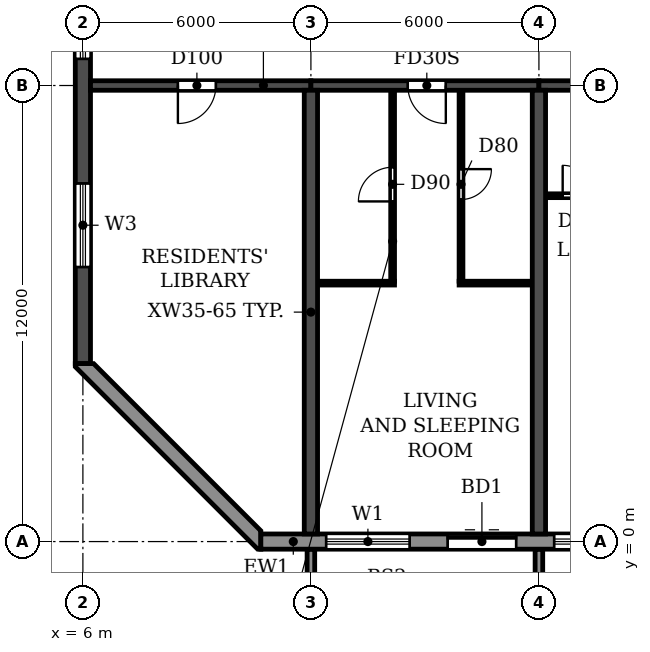
"""IFC4 building model, lengths in metres.
Left out: names, types, materials, properties, quantities, classifications, styles, units other than length and angle.
Written with IfcOpenShell. Run it as: python <this file> out.ifc"""

import sys

from ifc_helpers import new_model, si_unit, direction, frame, frame_2d, origin, place, context, subcontext, project, spatial, polyline, rectangle, outline, extrude, source, transform, mapped, element, fill, save


model = new_model("IFC4")
c1 = context("Model", 3, precision=1e-05, world=origin(), true_north=direction((0.0, 1.0)))
c2 = subcontext(c1, "Body", "Model", "MODEL_VIEW")
j1 = project(units=[si_unit("LENGTHUNIT", "METRE"), si_unit("PLANEANGLEUNIT", "RADIAN")], contexts=[c1])
p1 = place(None, origin())
s1 = spatial("IfcSite", under=j1, at=p1, CompositionType="ELEMENT")
p2 = place(p1, origin())
s2 = spatial("IfcBuilding", under=s1, at=p2, CompositionType="ELEMENT")
p3 = place(p2, frame((0.0, 0.0, 92.7)))
s3 = spatial("IfcBuildingStorey", under=s2, at=p3, CompositionType="ELEMENT", Elevation=92.7)
for number, where, z_axis, x_axis in (
    (1, (12.0, 0.2, 0.0), (0.0, 0.0, 1.0), (0.0, 1.0, 0.0)),
    (2, (18.0, 0.2, 0.0), (0.0, 0.0, 1.0), (0.0, 1.0, 0.0)),
):
    element("IfcWall", number, at=place(p3, frame(where, z_axis=z_axis, x_axis=x_axis)), inside=s3, PredefinedType="SHEAR", context=c2, shape_type="SweptSolid", body=[
        extrude(rectangle(XDim=11.675, YDim=0.35, at=frame_2d((5.837, 0.0))), origin(), (0.0, 0.0, 1.0), 3.06),
    ])
p4 = place(p3, frame((6.0, 4.683, 0.0), z_axis=(0.0, 0.0, 1.0), x_axis=(0.0, 1.0, 0.0)))
e3 = element("IfcWall", 3, at=p4, inside=s3, PredefinedType="SHEAR", context=c2, shape_type="SweptSolid", body=[
    extrude(rectangle(XDim=34.234, YDim=0.4, at=frame_2d((17.117, 0.0))), origin(), (0.0, 0.0, 1.0), 3.06),
])
p5 = place(p4, frame((23.817, 0.0, 0.9)))
e4 = element("IfcOpeningElement", 4, at=p5, cuts=e3, PredefinedType="OPENING", context=c2, shape_type="SweptSolid", body=[
    extrude(rectangle(XDim=1.2, YDim=1.5, at=frame_2d((0.6, 0.75))), frame((0.0, 0.21, 0.0), z_axis=(0.0, -1.0, 0.0), x_axis=(1.0, 0.0, 0.0)), (0.0, 0.0, 1.0), 0.42),
])
p6 = place(p4, frame((8.017, 0.0, 0.9)))
e5 = element("IfcOpeningElement", 5, at=p6, cuts=e3, PredefinedType="OPENING", context=c2, shape_type="SweptSolid", body=[
    extrude(rectangle(XDim=1.2, YDim=1.5, at=frame_2d((0.6, 0.75))), frame((0.0, 0.21, 0.0), z_axis=(0.0, -1.0, 0.0), x_axis=(1.0, 0.0, 0.0)), (0.0, 0.0, 1.0), 0.42),
])
p7 = place(p4, frame((15.917, 0.0, 0.9)))
e6 = element("IfcOpeningElement", 6, at=p7, cuts=e3, PredefinedType="OPENING", context=c2, shape_type="SweptSolid", body=[
    extrude(rectangle(XDim=1.2, YDim=1.5, at=frame_2d((0.6, 0.75))), frame((0.0, 0.21, 0.0), z_axis=(0.0, -1.0, 0.0), x_axis=(1.0, 0.0, 0.0)), (0.0, 0.0, 1.0), 0.42),
])
p8 = place(p4, frame((28.894, 0.0, 0.6)))
e7 = element("IfcOpeningElement", 7, at=p8, cuts=e3, PredefinedType="OPENING", context=c2, shape_type="SweptSolid", body=[
    extrude(rectangle(XDim=2.2, YDim=1.8, at=frame_2d((1.1, 0.9))), frame((0.0, 0.21, 0.0), z_axis=(0.0, -1.0, 0.0), x_axis=(1.0, 0.0, 0.0)), (0.0, 0.0, 1.0), 0.42),
])
p9 = place(p4, frame((2.541, 0.0, 0.6)))
e8 = element("IfcOpeningElement", 8, at=p9, cuts=e3, PredefinedType="OPENING", context=c2, shape_type="SweptSolid", body=[
    extrude(rectangle(XDim=2.2, YDim=1.8, at=frame_2d((1.1, 0.9))), frame((0.0, 0.21, 0.0), z_axis=(0.0, -1.0, 0.0), x_axis=(1.0, 0.0, 0.0)), (0.0, 0.0, 1.0), 0.42),
])
p10 = place(p3, frame((6.2, 12.0, 0.0), z_axis=(0.0, 0.0, 1.0), x_axis=(1.0, 0.0, 0.0)))
e9 = element("IfcWall", 9, at=p10, inside=s3, PredefinedType="SHEAR", context=c2, shape_type="SweptSolid", body=[
    extrude(rectangle(XDim=5.8, YDim=0.25, at=frame_2d((2.9, 0.0))), origin(), (0.0, 0.0, 1.0), 2.46),
])
p11 = place(p10, frame((2.3, 0.0, 0.0)))
e10 = element("IfcOpeningElement", 10, at=p11, cuts=e9, PredefinedType="OPENING", context=c2, shape_type="SweptSolid", body=[
    extrude(rectangle(XDim=1.0, YDim=2.1, at=frame_2d((0.5, 1.05))), frame((0.0, 0.135, 0.0), z_axis=(0.0, -1.0, 0.0), x_axis=(1.0, 0.0, 0.0)), (0.0, 0.0, 1.0), 0.27),
])
p12 = place(p3, frame((12.0, 12.0, 0.0), z_axis=(0.0, 0.0, 1.0), x_axis=(1.0, 0.0, 0.0)))
e11 = element("IfcWall", 11, at=p12, inside=s3, PredefinedType="SHEAR", context=c2, shape_type="SweptSolid", body=[
    extrude(rectangle(XDim=6.0, YDim=0.25, at=frame_2d((3.0, 0.0))), origin(), (0.0, 0.0, 1.0), 2.46),
])
p13 = place(p12, frame((2.55, 0.0, 0.0)))
e12 = element("IfcOpeningElement", 12, at=p13, cuts=e11, PredefinedType="OPENING", context=c2, shape_type="SweptSolid", body=[
    extrude(rectangle(XDim=1.0, YDim=2.1, at=frame_2d((0.5, 1.05))), frame((0.0, 0.135, 0.0), z_axis=(0.0, -1.0, 0.0), x_axis=(1.0, 0.0, 0.0)), (0.0, 0.0, 1.0), 0.27),
])
p14 = place(p3, frame((18.0, 12.0, 0.0), z_axis=(0.0, 0.0, 1.0), x_axis=(1.0, 0.0, 0.0)))
e13 = element("IfcWall", 13, at=p14, inside=s3, PredefinedType="SHEAR", context=c2, shape_type="SweptSolid", body=[
    extrude(rectangle(XDim=6.0, YDim=0.25, at=frame_2d((3.0, 0.0))), origin(), (0.0, 0.0, 1.0), 2.46),
])
p15 = place(p14, frame((2.45, 0.0, 0.0)))
e14 = element("IfcOpeningElement", 14, at=p15, cuts=e13, PredefinedType="OPENING", context=c2, shape_type="SweptSolid", body=[
    extrude(rectangle(XDim=1.0, YDim=2.1, at=frame_2d((0.5, 1.05))), frame((0.0, 0.135, 0.0), z_axis=(0.0, -1.0, 0.0), x_axis=(1.0, 0.0, 0.0)), (0.0, 0.0, 1.0), 0.27),
])
p16 = place(p3, frame((10.683, 0.0, 0.0), z_axis=(0.0, 0.0, 1.0), x_axis=(1.0, 0.0, 0.0)))
e15 = element("IfcWall", 15, at=p16, inside=s3, PredefinedType="STANDARD", context=c2, shape_type="SweptSolid", body=[
    extrude(rectangle(XDim=80.634, YDim=0.4, at=frame_2d((40.317, 0.0))), origin(), (0.0, 0.0, 1.0), 3.06),
])
p17 = place(p16, frame((1.717, 0.0, 0.9)))
e16 = element("IfcOpeningElement", 16, at=p17, cuts=e15, PredefinedType="OPENING", context=c2, shape_type="SweptSolid", body=[
    extrude(rectangle(XDim=2.2, YDim=1.5, at=frame_2d((1.1, 0.75))), frame((0.0, 0.21, 0.0), z_axis=(0.0, -1.0, 0.0), x_axis=(1.0, 0.0, 0.0)), (0.0, 0.0, 1.0), 0.42),
])
p18 = place(p16, frame((4.917, 0.0, 0.0)))
e17 = element("IfcOpeningElement", 17, at=p18, cuts=e15, PredefinedType="OPENING", context=c2, shape_type="SweptSolid", body=[
    extrude(rectangle(XDim=1.8, YDim=2.4, at=frame_2d((0.9, 1.2))), frame((0.0, 0.21, 0.0), z_axis=(0.0, -1.0, 0.0), x_axis=(1.0, 0.0, 0.0)), (0.0, 0.0, 1.0), 0.42),
])
p19 = place(p16, frame((7.717, 0.0, 0.9)))
e18 = element("IfcOpeningElement", 18, at=p19, cuts=e15, PredefinedType="OPENING", context=c2, shape_type="SweptSolid", body=[
    extrude(rectangle(XDim=2.2, YDim=1.5, at=frame_2d((1.1, 0.75))), frame((0.0, 0.21, 0.0), z_axis=(0.0, -1.0, 0.0), x_axis=(1.0, 0.0, 0.0)), (0.0, 0.0, 1.0), 0.42),
])
p20 = place(p16, frame((10.717, 0.0, 0.9)))
e19 = element("IfcOpeningElement", 19, at=p20, cuts=e15, PredefinedType="OPENING", context=c2, shape_type="SweptSolid", body=[
    extrude(rectangle(XDim=2.2, YDim=1.5, at=frame_2d((1.1, 0.75))), frame((0.0, 0.21, 0.0), z_axis=(0.0, -1.0, 0.0), x_axis=(1.0, 0.0, 0.0)), (0.0, 0.0, 1.0), 0.42),
])
p21 = place(p16, frame((13.717, 0.0, 0.9)))
e20 = element("IfcOpeningElement", 20, at=p21, cuts=e15, PredefinedType="OPENING", context=c2, shape_type="SweptSolid", body=[
    extrude(rectangle(XDim=2.2, YDim=1.5, at=frame_2d((1.1, 0.75))), frame((0.0, 0.21, 0.0), z_axis=(0.0, -1.0, 0.0), x_axis=(1.0, 0.0, 0.0)), (0.0, 0.0, 1.0), 0.42),
])
p22 = place(p16, frame((16.717, 0.0, 0.9)))
e21 = element("IfcOpeningElement", 21, at=p22, cuts=e15, PredefinedType="OPENING", context=c2, shape_type="SweptSolid", body=[
    extrude(rectangle(XDim=2.2, YDim=1.5, at=frame_2d((1.1, 0.75))), frame((0.0, 0.21, 0.0), z_axis=(0.0, -1.0, 0.0), x_axis=(1.0, 0.0, 0.0)), (0.0, 0.0, 1.0), 0.42),
])
p23 = place(p16, frame((19.717, 0.0, 0.9)))
e22 = element("IfcOpeningElement", 22, at=p23, cuts=e15, PredefinedType="OPENING", context=c2, shape_type="SweptSolid", body=[
    extrude(rectangle(XDim=2.2, YDim=1.5, at=frame_2d((1.1, 0.75))), frame((0.0, 0.21, 0.0), z_axis=(0.0, -1.0, 0.0), x_axis=(1.0, 0.0, 0.0)), (0.0, 0.0, 1.0), 0.42),
])
p24 = place(p16, frame((22.717, 0.0, 0.9)))
e23 = element("IfcOpeningElement", 23, at=p24, cuts=e15, PredefinedType="OPENING", context=c2, shape_type="SweptSolid", body=[
    extrude(rectangle(XDim=2.2, YDim=1.5, at=frame_2d((1.1, 0.75))), frame((0.0, 0.21, 0.0), z_axis=(0.0, -1.0, 0.0), x_axis=(1.0, 0.0, 0.0)), (0.0, 0.0, 1.0), 0.42),
])
p25 = place(p16, frame((25.717, 0.0, 0.9)))
e24 = element("IfcOpeningElement", 24, at=p25, cuts=e15, PredefinedType="OPENING", context=c2, shape_type="SweptSolid", body=[
    extrude(rectangle(XDim=2.2, YDim=1.5, at=frame_2d((1.1, 0.75))), frame((0.0, 0.21, 0.0), z_axis=(0.0, -1.0, 0.0), x_axis=(1.0, 0.0, 0.0)), (0.0, 0.0, 1.0), 0.42),
])
p26 = place(p16, frame((28.917, 0.0, 0.0)))
e25 = element("IfcOpeningElement", 25, at=p26, cuts=e15, PredefinedType="OPENING", context=c2, shape_type="SweptSolid", body=[
    extrude(rectangle(XDim=1.8, YDim=2.4, at=frame_2d((0.9, 1.2))), frame((0.0, 0.21, 0.0), z_axis=(0.0, -1.0, 0.0), x_axis=(1.0, 0.0, 0.0)), (0.0, 0.0, 1.0), 0.42),
])
p27 = place(p16, frame((31.717, 0.0, 0.9)))
e26 = element("IfcOpeningElement", 26, at=p27, cuts=e15, PredefinedType="OPENING", context=c2, shape_type="SweptSolid", body=[
    extrude(rectangle(XDim=2.2, YDim=1.5, at=frame_2d((1.1, 0.75))), frame((0.0, 0.21, 0.0), z_axis=(0.0, -1.0, 0.0), x_axis=(1.0, 0.0, 0.0)), (0.0, 0.0, 1.0), 0.42),
])
p28 = place(p16, frame((34.717, 0.0, 0.9)))
e27 = element("IfcOpeningElement", 27, at=p28, cuts=e15, PredefinedType="OPENING", context=c2, shape_type="SweptSolid", body=[
    extrude(rectangle(XDim=2.2, YDim=1.5, at=frame_2d((1.1, 0.75))), frame((0.0, 0.21, 0.0), z_axis=(0.0, -1.0, 0.0), x_axis=(1.0, 0.0, 0.0)), (0.0, 0.0, 1.0), 0.42),
])
p29 = place(p16, frame((37.917, 0.0, 0.0)))
e28 = element("IfcOpeningElement", 28, at=p29, cuts=e15, PredefinedType="OPENING", context=c2, shape_type="SweptSolid", body=[
    extrude(rectangle(XDim=1.8, YDim=2.4, at=frame_2d((0.9, 1.2))), frame((0.0, 0.21, 0.0), z_axis=(0.0, -1.0, 0.0), x_axis=(1.0, 0.0, 0.0)), (0.0, 0.0, 1.0), 0.42),
])
p30 = place(p16, frame((40.717, 0.0, 0.9)))
e29 = element("IfcOpeningElement", 29, at=p30, cuts=e15, PredefinedType="OPENING", context=c2, shape_type="SweptSolid", body=[
    extrude(rectangle(XDim=2.2, YDim=1.5, at=frame_2d((1.1, 0.75))), frame((0.0, 0.21, 0.0), z_axis=(0.0, -1.0, 0.0), x_axis=(1.0, 0.0, 0.0)), (0.0, 0.0, 1.0), 0.42),
])
p31 = place(p16, frame((43.717, 0.0, 0.9)))
e30 = element("IfcOpeningElement", 30, at=p31, cuts=e15, PredefinedType="OPENING", context=c2, shape_type="SweptSolid", body=[
    extrude(rectangle(XDim=2.2, YDim=1.5, at=frame_2d((1.1, 0.75))), frame((0.0, 0.21, 0.0), z_axis=(0.0, -1.0, 0.0), x_axis=(1.0, 0.0, 0.0)), (0.0, 0.0, 1.0), 0.42),
])
p32 = place(p16, frame((46.717, 0.0, 0.9)))
e31 = element("IfcOpeningElement", 31, at=p32, cuts=e15, PredefinedType="OPENING", context=c2, shape_type="SweptSolid", body=[
    extrude(rectangle(XDim=2.2, YDim=1.5, at=frame_2d((1.1, 0.75))), frame((0.0, 0.21, 0.0), z_axis=(0.0, -1.0, 0.0), x_axis=(1.0, 0.0, 0.0)), (0.0, 0.0, 1.0), 0.42),
])
p33 = place(p16, frame((49.717, 0.0, 0.9)))
e32 = element("IfcOpeningElement", 32, at=p33, cuts=e15, PredefinedType="OPENING", context=c2, shape_type="SweptSolid", body=[
    extrude(rectangle(XDim=2.2, YDim=1.5, at=frame_2d((1.1, 0.75))), frame((0.0, 0.21, 0.0), z_axis=(0.0, -1.0, 0.0), x_axis=(1.0, 0.0, 0.0)), (0.0, 0.0, 1.0), 0.42),
])
p34 = place(p16, frame((52.917, 0.0, 0.0)))
e33 = element("IfcOpeningElement", 33, at=p34, cuts=e15, PredefinedType="OPENING", context=c2, shape_type="SweptSolid", body=[
    extrude(rectangle(XDim=1.8, YDim=2.4, at=frame_2d((0.9, 1.2))), frame((0.0, 0.21, 0.0), z_axis=(0.0, -1.0, 0.0), x_axis=(1.0, 0.0, 0.0)), (0.0, 0.0, 1.0), 0.42),
])
p35 = place(p16, frame((55.717, 0.0, 0.9)))
e34 = element("IfcOpeningElement", 34, at=p35, cuts=e15, PredefinedType="OPENING", context=c2, shape_type="SweptSolid", body=[
    extrude(rectangle(XDim=2.2, YDim=1.5, at=frame_2d((1.1, 0.75))), frame((0.0, 0.21, 0.0), z_axis=(0.0, -1.0, 0.0), x_axis=(1.0, 0.0, 0.0)), (0.0, 0.0, 1.0), 0.42),
])
p36 = place(p16, frame((58.717, 0.0, 0.9)))
e35 = element("IfcOpeningElement", 35, at=p36, cuts=e15, PredefinedType="OPENING", context=c2, shape_type="SweptSolid", body=[
    extrude(rectangle(XDim=2.2, YDim=1.5, at=frame_2d((1.1, 0.75))), frame((0.0, 0.21, 0.0), z_axis=(0.0, -1.0, 0.0), x_axis=(1.0, 0.0, 0.0)), (0.0, 0.0, 1.0), 0.42),
])
p37 = place(p16, frame((61.717, 0.0, 0.9)))
e36 = element("IfcOpeningElement", 36, at=p37, cuts=e15, PredefinedType="OPENING", context=c2, shape_type="SweptSolid", body=[
    extrude(rectangle(XDim=2.2, YDim=1.5, at=frame_2d((1.1, 0.75))), frame((0.0, 0.21, 0.0), z_axis=(0.0, -1.0, 0.0), x_axis=(1.0, 0.0, 0.0)), (0.0, 0.0, 1.0), 0.42),
])
p38 = place(p16, frame((64.917, 0.0, 0.0)))
e37 = element("IfcOpeningElement", 37, at=p38, cuts=e15, PredefinedType="OPENING", context=c2, shape_type="SweptSolid", body=[
    extrude(rectangle(XDim=1.8, YDim=2.4, at=frame_2d((0.9, 1.2))), frame((0.0, 0.21, 0.0), z_axis=(0.0, -1.0, 0.0), x_axis=(1.0, 0.0, 0.0)), (0.0, 0.0, 1.0), 0.42),
])
p39 = place(p16, frame((67.717, 0.0, 0.9)))
e38 = element("IfcOpeningElement", 38, at=p39, cuts=e15, PredefinedType="OPENING", context=c2, shape_type="SweptSolid", body=[
    extrude(rectangle(XDim=2.2, YDim=1.5, at=frame_2d((1.1, 0.75))), frame((0.0, 0.21, 0.0), z_axis=(0.0, -1.0, 0.0), x_axis=(1.0, 0.0, 0.0)), (0.0, 0.0, 1.0), 0.42),
])
p40 = place(p16, frame((70.717, 0.0, 0.9)))
e39 = element("IfcOpeningElement", 39, at=p40, cuts=e15, PredefinedType="OPENING", context=c2, shape_type="SweptSolid", body=[
    extrude(rectangle(XDim=2.2, YDim=1.5, at=frame_2d((1.1, 0.75))), frame((0.0, 0.21, 0.0), z_axis=(0.0, -1.0, 0.0), x_axis=(1.0, 0.0, 0.0)), (0.0, 0.0, 1.0), 0.42),
])
p41 = place(p16, frame((73.917, 0.0, 0.0)))
e40 = element("IfcOpeningElement", 40, at=p41, cuts=e15, PredefinedType="OPENING", context=c2, shape_type="SweptSolid", body=[
    extrude(rectangle(XDim=1.8, YDim=2.4, at=frame_2d((0.9, 1.2))), frame((0.0, 0.21, 0.0), z_axis=(0.0, -1.0, 0.0), x_axis=(1.0, 0.0, 0.0)), (0.0, 0.0, 1.0), 0.42),
])
p42 = place(p16, frame((76.717, 0.0, 0.9)))
e41 = element("IfcOpeningElement", 41, at=p42, cuts=e15, PredefinedType="OPENING", context=c2, shape_type="SweptSolid", body=[
    extrude(rectangle(XDim=2.2, YDim=1.5, at=frame_2d((1.1, 0.75))), frame((0.0, 0.21, 0.0), z_axis=(0.0, -1.0, 0.0), x_axis=(1.0, 0.0, 0.0)), (0.0, 0.0, 1.0), 0.42),
])
p43 = place(p3, origin())
e42 = element("IfcWall", 42, at=p43, inside=s3, PredefinedType="STANDARD", context=c2, shape_type="SweptSolid", body=[
    extrude(outline(polyline([(5.8, 4.683), (5.8, 4.6), (10.6, -0.2), (10.683, -0.2), (10.683, 0.283), (6.283, 4.683), (5.8, 4.683)])), origin(), (0.0, 0.0, 1.0), 3.06),
])
m1 = source(origin(), c2, "Body", "SweptSolid", [
    extrude(outline(polyline([(0.0, 0.0), (0.2, 0.0), (0.2, 1.65), (0.0, 1.65), (0.0, 0.0)])), origin(), (0.0, 0.0, 1.0), 3.1),
])
for number, where in (
    (43, (11.9, -1.85, 0.0)),
    (44, (17.9, -1.85, 0.0)),
):
    element("IfcWall", number, at=place(p3, frame(where)), inside=s3, PredefinedType="STANDARD", context=c2, shape_type="MappedRepresentation", body=[
        mapped(m1, transform((0.0, 0.0, 0.0))),
    ])
p44 = place(p3, frame((12.185, 6.8, 0.0), z_axis=(0.0, 0.0, 1.0), x_axis=(1.0, 0.0, 0.0)))
e45 = element("IfcWall", 45, at=p44, inside=s3, PredefinedType="PARTITIONING", context=c2, shape_type="SweptSolid", body=[
    extrude(rectangle(XDim=2.015, YDim=0.1, at=frame_2d((1.007, 0.0))), origin(), (0.0, 0.0, 1.0), 3.06),
])
p45 = place(p3, frame((15.9, 6.8, 0.0), z_axis=(0.0, 0.0, 1.0), x_axis=(1.0, 0.0, 0.0)))
e46 = element("IfcWall", 46, at=p45, inside=s3, PredefinedType="PARTITIONING", context=c2, shape_type="SweptSolid", body=[
    extrude(rectangle(XDim=1.915, YDim=0.1, at=frame_2d((0.958, 0.0))), origin(), (0.0, 0.0, 1.0), 3.06),
])
p46 = place(p3, frame((18.185, 9.1, 0.0), z_axis=(0.0, 0.0, 1.0), x_axis=(1.0, 0.0, 0.0)))
e47 = element("IfcWall", 47, at=p46, inside=s3, PredefinedType="PARTITIONING", context=c2, shape_type="SweptSolid", body=[
    extrude(rectangle(XDim=1.915, YDim=0.1, at=frame_2d((0.958, 0.0))), origin(), (0.0, 0.0, 1.0), 3.06),
])
p47 = place(p46, frame((0.44, 0.0, 0.0)))
e48 = element("IfcOpeningElement", 48, at=p47, cuts=e47, PredefinedType="OPENING", context=c2, shape_type="SweptSolid", body=[
    extrude(rectangle(XDim=0.8, YDim=2.1, at=frame_2d((0.4, 1.05))), frame((0.0, 0.06, 0.0), z_axis=(0.0, -1.0, 0.0), x_axis=(1.0, 0.0, 0.0)), (0.0, 0.0, 1.0), 0.12),
])
p48 = place(p3, frame((14.15, 6.85, 0.0), z_axis=(0.0, 0.0, 1.0), x_axis=(0.0, 1.0, 0.0)))
e49 = element("IfcWall", 49, at=p48, inside=s3, PredefinedType="PARTITIONING", context=c2, shape_type="SweptSolid", body=[
    extrude(rectangle(XDim=5.015, YDim=0.1, at=frame_2d((2.507, 0.0))), origin(), (0.0, 0.0, 1.0), 3.06),
])
p49 = place(p48, frame((2.1, 0.0, 0.0)))
e50 = element("IfcOpeningElement", 50, at=p49, cuts=e49, PredefinedType="OPENING", context=c2, shape_type="SweptSolid", body=[
    extrude(rectangle(XDim=0.9, YDim=2.1, at=frame_2d((0.45, 1.05))), frame((0.0, 0.06, 0.0), z_axis=(0.0, -1.0, 0.0), x_axis=(1.0, 0.0, 0.0)), (0.0, 0.0, 1.0), 0.12),
])
p50 = place(p3, frame((15.95, 6.85, 0.0), z_axis=(0.0, 0.0, 1.0), x_axis=(0.0, 1.0, 0.0)))
e51 = element("IfcWall", 51, at=p50, inside=s3, PredefinedType="PARTITIONING", context=c2, shape_type="SweptSolid", body=[
    extrude(rectangle(XDim=5.015, YDim=0.1, at=frame_2d((2.507, 0.0))), origin(), (0.0, 0.0, 1.0), 3.06),
])
p51 = place(p50, frame((2.15, 0.0, 0.0)))
e52 = element("IfcOpeningElement", 52, at=p51, cuts=e51, PredefinedType="OPENING", context=c2, shape_type="SweptSolid", body=[
    extrude(rectangle(XDim=0.8, YDim=2.1, at=frame_2d((0.4, 1.05))), frame((0.0, 0.06, 0.0), z_axis=(0.0, -1.0, 0.0), x_axis=(1.0, 0.0, 0.0)), (0.0, 0.0, 1.0), 0.12),
])
p52 = place(p17, origin())
e53 = element("IfcWindow", 53, at=p52, inside=s3, PartitioningType="DOUBLE_PANEL_HORIZONTAL", PredefinedType="WINDOW", context=c2, shape_type="SweptSolid", body=[
    extrude(rectangle(XDim=2.2, YDim=1.5, at=frame_2d((1.1, 0.75))), frame((0.0, 0.03, 0.0), z_axis=(0.0, -1.0, 0.0), x_axis=(1.0, 0.0, 0.0)), (0.0, 0.0, 1.0), 0.06),
])
fill(e16, e53)
p53 = place(p18, origin())
e54 = element("IfcDoor", 54, at=p53, inside=s3, OperationType="DOUBLE_DOOR_SLIDING", PredefinedType="DOOR", context=c2, shape_type="SweptSolid", body=[
    extrude(rectangle(XDim=1.8, YDim=2.4, at=frame_2d((0.9, 1.2))), frame((0.0, 0.025, 0.0), z_axis=(0.0, -1.0, 0.0), x_axis=(1.0, 0.0, 0.0)), (0.0, 0.0, 1.0), 0.05),
])
fill(e17, e54)
p54 = place(p19, origin())
e55 = element("IfcWindow", 55, at=p54, inside=s3, PartitioningType="DOUBLE_PANEL_HORIZONTAL", PredefinedType="WINDOW", context=c2, shape_type="SweptSolid", body=[
    extrude(rectangle(XDim=2.2, YDim=1.5, at=frame_2d((1.1, 0.75))), frame((0.0, 0.03, 0.0), z_axis=(0.0, -1.0, 0.0), x_axis=(1.0, 0.0, 0.0)), (0.0, 0.0, 1.0), 0.06),
])
fill(e18, e55)
p55 = place(p6, origin())
e56 = element("IfcWindow", 56, at=p55, inside=s3, PartitioningType="SINGLE_PANEL", PredefinedType="WINDOW", context=c2, shape_type="SweptSolid", body=[
    extrude(rectangle(XDim=1.2, YDim=1.5, at=frame_2d((0.6, 0.75))), frame((0.0, 0.03, 0.0), z_axis=(0.0, -1.0, 0.0), x_axis=(1.0, 0.0, 0.0)), (0.0, 0.0, 1.0), 0.06),
])
fill(e5, e56)
p56 = place(p9, origin())
e57 = element("IfcWindow", 57, at=p56, inside=s3, PartitioningType="DOUBLE_PANEL_HORIZONTAL", PredefinedType="WINDOW", context=c2, shape_type="SweptSolid", body=[
    extrude(rectangle(XDim=2.2, YDim=1.8, at=frame_2d((1.1, 0.9))), frame((0.0, 0.03, 0.0), z_axis=(0.0, -1.0, 0.0), x_axis=(1.0, 0.0, 0.0)), (0.0, 0.0, 1.0), 0.06),
])
fill(e8, e57)
p57 = place(p11, frame((1.0, 0.0, 0.0), z_axis=(0.0, 0.0, 1.0), x_axis=(-1.0, 0.0, 0.0)))
e58 = element("IfcDoor", 58, at=p57, inside=s3, OperationType="SINGLE_SWING_RIGHT", PredefinedType="DOOR", context=c2, shape_type="SweptSolid", body=[
    extrude(rectangle(XDim=1.0, YDim=2.1, at=frame_2d((0.5, 1.05))), frame((0.0, 0.025, 0.0), z_axis=(0.0, -1.0, 0.0), x_axis=(1.0, 0.0, 0.0)), (0.0, 0.0, 1.0), 0.05),
])
fill(e10, e58)
p58 = place(p49, origin())
e59 = element("IfcDoor", 59, at=p58, inside=s3, OperationType="SINGLE_SWING_LEFT", PredefinedType="DOOR", context=c2, shape_type="SweptSolid", body=[
    extrude(rectangle(XDim=0.9, YDim=2.1, at=frame_2d((0.45, 1.05))), frame((0.0, 0.025, 0.0), z_axis=(0.0, -1.0, 0.0), x_axis=(1.0, 0.0, 0.0)), (0.0, 0.0, 1.0), 0.05),
])
fill(e50, e59)
p59 = place(p13, frame((1.0, 0.0, 0.0), z_axis=(0.0, 0.0, 1.0), x_axis=(-1.0, 0.0, 0.0)))
e60 = element("IfcDoor", 60, at=p59, inside=s3, OperationType="SINGLE_SWING_LEFT", PredefinedType="DOOR", context=c2, shape_type="SweptSolid", body=[
    extrude(rectangle(XDim=1.0, YDim=2.1, at=frame_2d((0.5, 1.05))), frame((0.0, 0.025, 0.0), z_axis=(0.0, -1.0, 0.0), x_axis=(1.0, 0.0, 0.0)), (0.0, 0.0, 1.0), 0.05),
])
fill(e12, e60)
p60 = place(p51, frame((0.8, 0.0, 0.0), z_axis=(0.0, 0.0, 1.0), x_axis=(-1.0, 0.0, 0.0)))
e61 = element("IfcDoor", 61, at=p60, inside=s3, OperationType="SINGLE_SWING_LEFT", PredefinedType="DOOR", context=c2, shape_type="SweptSolid", body=[
    extrude(rectangle(XDim=0.8, YDim=2.1, at=frame_2d((0.4, 1.05))), frame((0.0, 0.025, 0.0), z_axis=(0.0, -1.0, 0.0), x_axis=(1.0, 0.0, 0.0)), (0.0, 0.0, 1.0), 0.05),
])
fill(e52, e61)
p61 = place(p47, origin())
e62 = element("IfcDoor", 62, at=p61, inside=s3, OperationType="SINGLE_SWING_LEFT", PredefinedType="DOOR", context=c2, shape_type="SweptSolid", body=[
    extrude(rectangle(XDim=0.8, YDim=2.1, at=frame_2d((0.4, 1.05))), frame((0.0, 0.025, 0.0), z_axis=(0.0, -1.0, 0.0), x_axis=(1.0, 0.0, 0.0)), (0.0, 0.0, 1.0), 0.05),
])
fill(e48, e62)
save(model, sys.argv[1])
